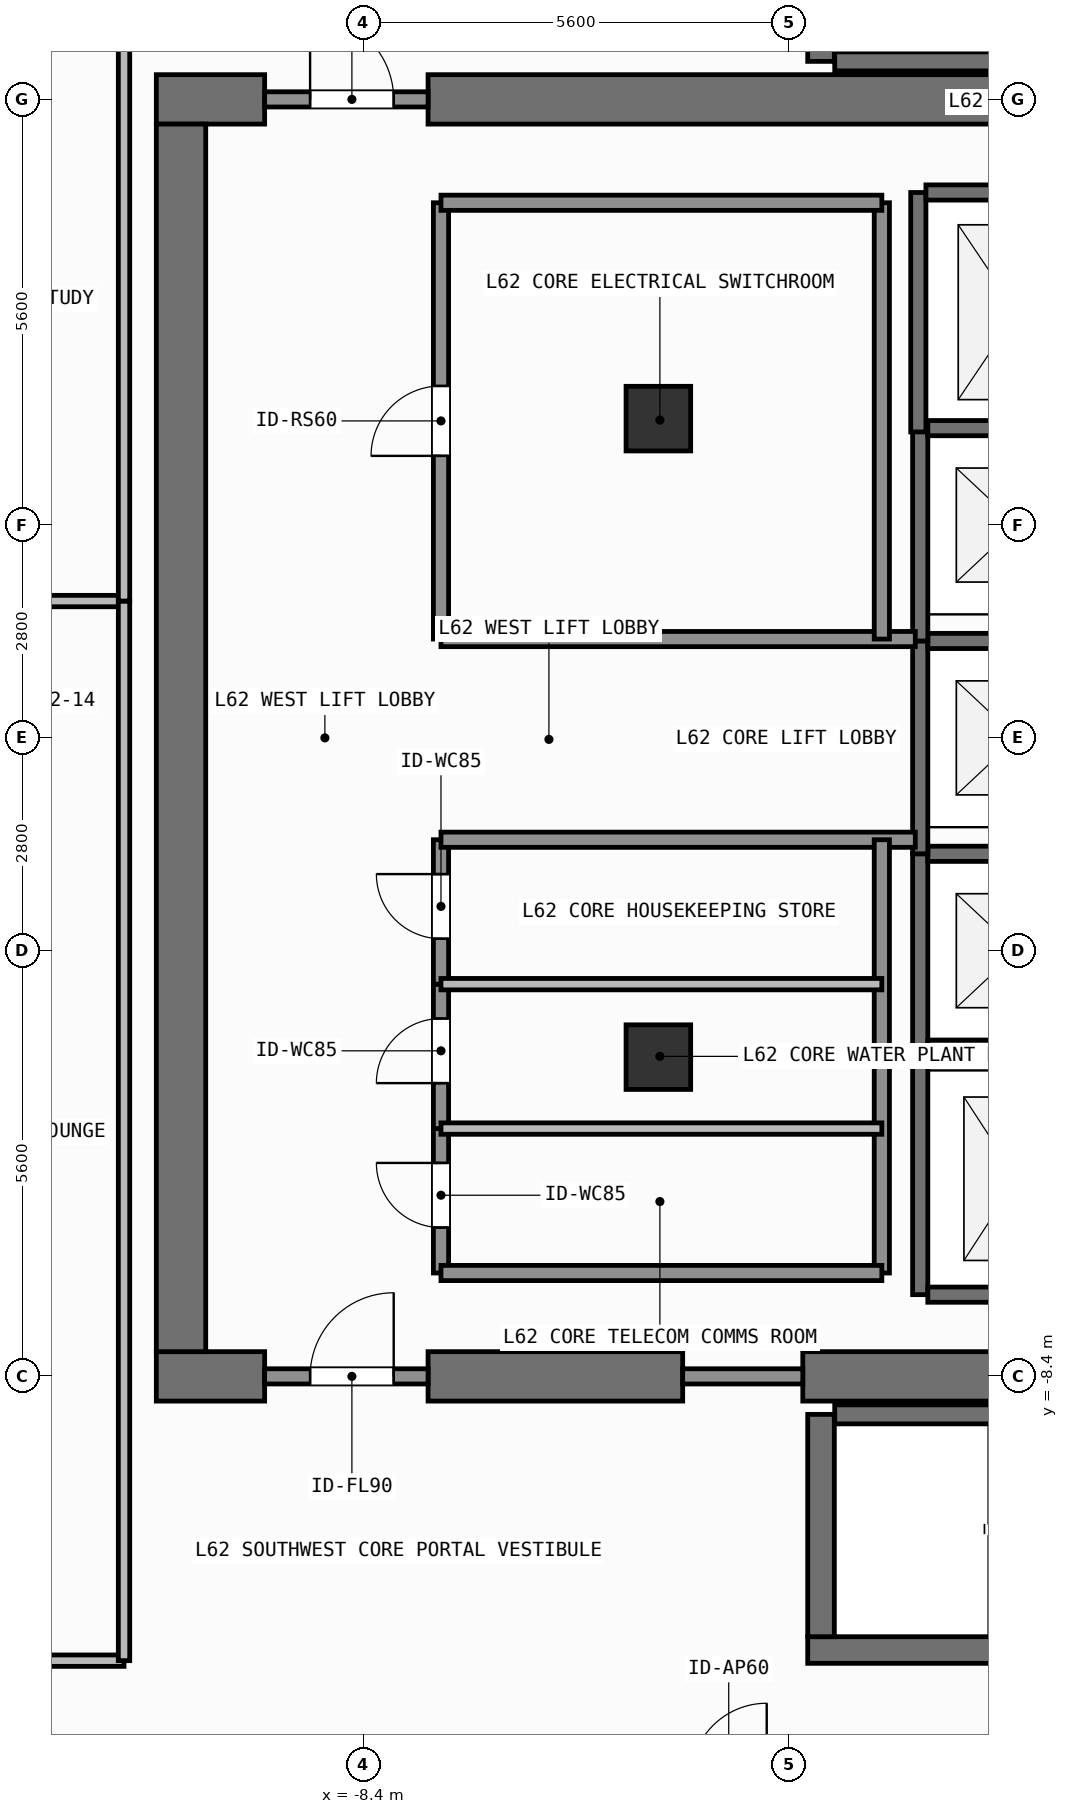
"""IFC4 building model, lengths in metres.
Left out: names, types, materials, properties, quantities, classifications, styles, units other than length and angle.
Written with IfcOpenShell. Run it as: python <this file> out.ifc"""

import sys

from ifc_helpers import new_model, si_unit, direction, frame, frame_2d, origin, origin_2d, place, context, subcontext, project, spatial, rectangle, extrude, element, fill, save


model = new_model("IFC4")
c1 = context("Model", 3, precision=1e-05, world=origin(), true_north=direction((0.0, 1.0)))
c2 = subcontext(c1, "Body", "Model", "MODEL_VIEW")
j1 = project(units=[si_unit("LENGTHUNIT", "METRE"), si_unit("PLANEANGLEUNIT", "RADIAN")], contexts=[c1])
p1 = place(None, origin())
s1 = spatial("IfcSite", under=j1, at=p1, CompositionType="ELEMENT")
p2 = place(p1, origin())
s2 = spatial("IfcBuilding", under=s1, at=p2, CompositionType="ELEMENT")
p3 = place(p2, frame((0.0, 0.0, 254.7)))
s3 = spatial("IfcBuildingStorey", under=s2, at=p3, CompositionType="ELEMENT", Elevation=254.7)
p4 = place(p3, frame((-11.125, -8.4, 0.0), z_axis=(0.0, 0.0, 1.0), x_axis=(1.0, 0.0, 0.0)))
e1 = element("IfcWall", 1, at=p4, inside=s3, PredefinedType="SHEAR", context=c2, shape_type="SweptSolid", body=[
    extrude(rectangle(XDim=1.425, YDim=0.65, at=frame_2d((0.712, 0.0))), origin(), (0.0, 0.0, 1.0), 3.9),
])
p5 = place(p3, frame((-7.55, -8.4, 0.0), z_axis=(0.0, 0.0, 1.0), x_axis=(1.0, 0.0, 0.0)))
e2 = element("IfcWall", 2, at=p5, inside=s3, PredefinedType="SHEAR", context=c2, shape_type="SweptSolid", body=[
    extrude(rectangle(XDim=3.35, YDim=0.65, at=frame_2d((1.675, 0.0))), origin(), (0.0, 0.0, 1.0), 3.9),
])
p6 = place(p3, frame((-2.62, -8.4, 0.0), z_axis=(0.0, 0.0, 1.0), x_axis=(1.0, 0.0, 0.0)))
e3 = element("IfcWall", 3, at=p6, inside=s3, PredefinedType="SHEAR", context=c2, shape_type="SweptSolid", body=[
    extrude(rectangle(XDim=7.27, YDim=0.65, at=frame_2d((3.635, 0.0))), origin(), (0.0, 0.0, 1.0), 3.9),
])
p7 = place(p3, frame((-11.125, 8.4, 0.0), z_axis=(0.0, 0.0, 1.0), x_axis=(1.0, 0.0, 0.0)))
e4 = element("IfcWall", 4, at=p7, inside=s3, PredefinedType="SHEAR", context=c2, shape_type="SweptSolid", body=[
    extrude(rectangle(XDim=1.425, YDim=0.65, at=frame_2d((0.712, 0.0))), origin(), (0.0, 0.0, 1.0), 3.9),
])
p8 = place(p3, frame((-7.55, 8.4, 0.0), z_axis=(0.0, 0.0, 1.0), x_axis=(1.0, 0.0, 0.0)))
e5 = element("IfcWall", 5, at=p8, inside=s3, PredefinedType="SHEAR", context=c2, shape_type="SweptSolid", body=[
    extrude(rectangle(XDim=16.275, YDim=0.65, at=frame_2d((8.138, 0.0))), origin(), (0.0, 0.0, 1.0), 3.9),
])
p9 = place(p3, frame((-10.8, -8.075, 0.0), z_axis=(0.0, 0.0, 1.0), x_axis=(0.0, 1.0, 0.0)))
e6 = element("IfcWall", 6, at=p9, inside=s3, PredefinedType="SHEAR", context=c2, shape_type="SweptSolid", body=[
    extrude(rectangle(XDim=16.15, YDim=0.65, at=frame_2d((8.075, 0.0))), origin(), (0.0, 0.0, 1.0), 3.9),
])
p10 = place(p3, frame((-2.555, -12.0, 0.0), z_axis=(0.0, 0.0, 1.0), x_axis=(1.0, 0.0, 0.0)))
e7 = element("IfcWall", 7, at=p10, inside=s3, PredefinedType="SHEAR", context=c2, shape_type="SweptSolid", body=[
    extrude(rectangle(XDim=7.31, YDim=0.35, at=frame_2d((3.655, 0.0))), origin(), (0.0, 0.0, 1.0), 3.9),
])
p11 = place(p3, frame((-2.2, -8.9, 0.0), z_axis=(0.0, 0.0, 1.0), x_axis=(1.0, 0.0, 0.0)))
e8 = element("IfcWall", 8, at=p11, inside=s3, PredefinedType="SHEAR", context=c2, shape_type="SweptSolid", body=[
    extrude(rectangle(XDim=6.6, YDim=0.25, at=frame_2d((3.3, 0.0))), origin(), (0.0, 0.0, 1.0), 3.9),
])
p12 = place(p3, frame((-2.38, -11.825, 0.0), z_axis=(0.0, 0.0, 1.0), x_axis=(0.0, 1.0, 0.0)))
e9 = element("IfcWall", 9, at=p12, inside=s3, PredefinedType="SHEAR", context=c2, shape_type="SweptSolid", body=[
    extrude(rectangle(XDim=2.925, YDim=0.35, at=frame_2d((1.462, 0.0))), origin(), (0.0, 0.0, 1.0), 3.9),
])
p13 = place(p3, frame((-2.2, 8.9, 0.0), z_axis=(0.0, 0.0, 1.0), x_axis=(1.0, 0.0, 0.0)))
e10 = element("IfcWall", 10, at=p13, inside=s3, PredefinedType="SHEAR", context=c2, shape_type="SweptSolid", body=[
    extrude(rectangle(XDim=6.6, YDim=0.25, at=frame_2d((3.3, 0.0))), origin(), (0.0, 0.0, 1.0), 3.9),
])
p14 = place(p3, frame((-2.38, 8.9, 0.0), z_axis=(0.0, 0.0, 1.0), x_axis=(0.0, 1.0, 0.0)))
e11 = element("IfcWall", 11, at=p14, inside=s3, PredefinedType="SHEAR", context=c2, shape_type="SweptSolid", body=[
    extrude(rectangle(XDim=2.925, YDim=0.35, at=frame_2d((1.462, 0.0))), origin(), (0.0, 0.0, 1.0), 3.9),
])
for number, where, z_axis, x_axis in (
    (12, (-4.52, -4.2, 0.0), (0.0, 0.0, 1.0), (1.0, 0.0, 0.0)),
    (13, (-4.52, 4.2, 0.0), (0.0, 0.0, 1.0), (1.0, 0.0, 0.0)),
):
    element("IfcColumn", number, at=place(p3, frame(where, z_axis=z_axis, x_axis=x_axis)), inside=s3, PredefinedType="COLUMN", context=c2, shape_type="SweptSolid", body=[
        extrude(rectangle(XDim=0.85, YDim=0.85, at=origin_2d()), origin(), (0.0, 0.0, 1.0), 3.9),
    ])
p15 = place(p3, frame((-1.075, -4.275, 0.0), z_axis=(0.0, 0.0, 1.0), x_axis=(0.0, 1.0, 0.0)))
e14 = element("IfcWall", 14, at=p15, inside=s3, PredefinedType="SHEAR", context=c2, shape_type="SweptSolid", body=[
    extrude(rectangle(XDim=2.75, YDim=0.2, at=frame_2d((1.375, 0.0))), origin(), (0.0, 0.0, 1.0), 3.68),
])
for number, where, z_axis, x_axis in (
    (15, (-0.975, -4.075, 0.0), (0.0, 0.0, 1.0), (1.0, 0.0, 0.0)),
    (16, (-0.975, -1.525, 0.0), (0.0, 0.0, 1.0), (1.0, 0.0, 0.0)),
):
    element("IfcWall", number, at=place(p3, frame(where, z_axis=z_axis, x_axis=x_axis)), inside=s3, PredefinedType="SHEAR", context=c2, shape_type="SweptSolid", body=[
        extrude(rectangle(XDim=2.35, YDim=0.2, at=frame_2d((1.175, 0.0))), origin(), (0.0, 0.0, 1.0), 3.68),
    ])
p16 = place(p3, frame((-1.075, -1.525, 0.0), z_axis=(0.0, 0.0, 1.0), x_axis=(0.0, 1.0, 0.0)))
e17 = element("IfcWall", 17, at=p16, inside=s3, PredefinedType="SHEAR", context=c2, shape_type="SweptSolid", body=[
    extrude(rectangle(XDim=2.8, YDim=0.2, at=frame_2d((1.4, 0.0))), origin(), (0.0, 0.0, 1.0), 3.68),
])
p17 = place(p3, frame((-0.975, 1.275, 0.0), z_axis=(0.0, 0.0, 1.0), x_axis=(1.0, 0.0, 0.0)))
e18 = element("IfcWall", 18, at=p17, inside=s3, PredefinedType="SHEAR", context=c2, shape_type="SweptSolid", body=[
    extrude(rectangle(XDim=2.35, YDim=0.2, at=frame_2d((1.175, 0.0))), origin(), (0.0, 0.0, 1.0), 3.68),
])
p18 = place(p3, frame((-1.075, 1.275, 0.0), z_axis=(0.0, 0.0, 1.0), x_axis=(0.0, 1.0, 0.0)))
e19 = element("IfcWall", 19, at=p18, inside=s3, PredefinedType="SHEAR", context=c2, shape_type="SweptSolid", body=[
    extrude(rectangle(XDim=2.8, YDim=0.2, at=frame_2d((1.4, 0.0))), origin(), (0.0, 0.0, 1.0), 3.68),
])
p19 = place(p3, frame((-0.975, 4.075, 0.0), z_axis=(0.0, 0.0, 1.0), x_axis=(1.0, 0.0, 0.0)))
e20 = element("IfcWall", 20, at=p19, inside=s3, PredefinedType="SHEAR", context=c2, shape_type="SweptSolid", body=[
    extrude(rectangle(XDim=2.35, YDim=0.2, at=frame_2d((1.175, 0.0))), origin(), (0.0, 0.0, 1.0), 3.68),
])
p20 = place(p3, frame((-1.1, 4.025, 0.0), z_axis=(0.0, 0.0, 1.0), x_axis=(0.0, 1.0, 0.0)))
e21 = element("IfcWall", 21, at=p20, inside=s3, PredefinedType="SHEAR", context=c2, shape_type="SweptSolid", body=[
    extrude(rectangle(XDim=3.15, YDim=0.2, at=frame_2d((1.575, 0.0))), origin(), (0.0, 0.0, 1.0), 3.68),
])
p21 = place(p3, frame((-1.0, 7.175, 0.0), z_axis=(0.0, 0.0, 1.0), x_axis=(1.0, 0.0, 0.0)))
e22 = element("IfcWall", 22, at=p21, inside=s3, PredefinedType="SHEAR", context=c2, shape_type="SweptSolid", body=[
    extrude(rectangle(XDim=2.4, YDim=0.2, at=frame_2d((1.2, 0.0))), origin(), (0.0, 0.0, 1.0), 3.68),
])
p22 = place(p3, frame((-1.075, -7.325, 0.0), z_axis=(0.0, 0.0, 1.0), x_axis=(0.0, 1.0, 0.0)))
e23 = element("IfcWall", 23, at=p22, inside=s3, PredefinedType="SHEAR", context=c2, shape_type="SweptSolid", body=[
    extrude(rectangle(XDim=3.05, YDim=0.2, at=frame_2d((1.525, 0.0))), origin(), (0.0, 0.0, 1.0), 3.68),
])
p23 = place(p3, frame((-0.975, -7.325, 0.0), z_axis=(0.0, 0.0, 1.0), x_axis=(1.0, 0.0, 0.0)))
e24 = element("IfcWall", 24, at=p23, inside=s3, PredefinedType="SHEAR", context=c2, shape_type="SweptSolid", body=[
    extrude(rectangle(XDim=2.35, YDim=0.2, at=frame_2d((1.175, 0.0))), origin(), (0.0, 0.0, 1.0), 3.68),
])
p24 = place(p3, frame((-9.7, -8.4, 0.0), z_axis=(0.0, 0.0, 1.0), x_axis=(1.0, 0.0, 0.0)))
e25 = element("IfcWall", 25, at=p24, inside=s3, PredefinedType="SOLIDWALL", context=c2, shape_type="SweptSolid", body=[
    extrude(rectangle(XDim=2.15, YDim=0.2, at=frame_2d((1.075, 0.0))), origin(), (0.0, 0.0, 1.0), 2.92),
])
p25 = place(p24, frame((0.598, 0.0, 0.0)))
e26 = element("IfcOpeningElement", 26, at=p25, cuts=e25, PredefinedType="OPENING", context=c2, shape_type="SweptSolid", body=[
    extrude(rectangle(XDim=1.1, YDim=2.15, at=frame_2d((0.55, 1.075))), frame((0.0, 0.11, 0.0), z_axis=(0.0, -1.0, 0.0), x_axis=(1.0, 0.0, 0.0)), (0.0, 0.0, 1.0), 0.22),
])
p26 = place(p3, frame((-9.7, 8.4, 0.0), z_axis=(0.0, 0.0, 1.0), x_axis=(1.0, 0.0, 0.0)))
e27 = element("IfcWall", 27, at=p26, inside=s3, PredefinedType="SOLIDWALL", context=c2, shape_type="SweptSolid", body=[
    extrude(rectangle(XDim=2.15, YDim=0.2, at=frame_2d((1.075, 0.0))), origin(), (0.0, 0.0, 1.0), 2.92),
])
p27 = place(p26, frame((0.598, 0.0, 0.0)))
e28 = element("IfcOpeningElement", 28, at=p27, cuts=e27, PredefinedType="OPENING", context=c2, shape_type="SweptSolid", body=[
    extrude(rectangle(XDim=1.1, YDim=2.15, at=frame_2d((0.55, 1.075))), frame((0.0, 0.11, 0.0), z_axis=(0.0, -1.0, 0.0), x_axis=(1.0, 0.0, 0.0)), (0.0, 0.0, 1.0), 0.22),
])
p28 = place(p3, frame((-7.38, -7.04, 0.0), z_axis=(0.0, 0.0, 1.0), x_axis=(0.0, 1.0, 0.0)))
e29 = element("IfcWall", 29, at=p28, inside=s3, PredefinedType="SOLIDWALL", context=c2, shape_type="SweptSolid", body=[
    extrude(rectangle(XDim=1.9, YDim=0.2, at=frame_2d((0.95, 0.0))), origin(), (0.0, 0.0, 1.0), 3.68),
])
p29 = place(p28, frame((0.598, 0.0, 0.0)))
e30 = element("IfcOpeningElement", 30, at=p29, cuts=e29, PredefinedType="OPENING", context=c2, shape_type="SweptSolid", body=[
    extrude(rectangle(XDim=0.85, YDim=2.1, at=frame_2d((0.425, 1.05))), frame((0.0, 0.11, 0.0), z_axis=(0.0, -1.0, 0.0), x_axis=(1.0, 0.0, 0.0)), (0.0, 0.0, 1.0), 0.22),
])
p30 = place(p3, frame((-7.38, -5.14, 0.0), z_axis=(0.0, 0.0, 1.0), x_axis=(0.0, 1.0, 0.0)))
e31 = element("IfcWall", 31, at=p30, inside=s3, PredefinedType="SOLIDWALL", context=c2, shape_type="SweptSolid", body=[
    extrude(rectangle(XDim=1.9, YDim=0.2, at=frame_2d((0.95, 0.0))), origin(), (0.0, 0.0, 1.0), 3.68),
])
p31 = place(p30, frame((0.598, 0.0, 0.0)))
e32 = element("IfcOpeningElement", 32, at=p31, cuts=e31, PredefinedType="OPENING", context=c2, shape_type="SweptSolid", body=[
    extrude(rectangle(XDim=0.85, YDim=2.1, at=frame_2d((0.425, 1.05))), frame((0.0, 0.11, 0.0), z_axis=(0.0, -1.0, 0.0), x_axis=(1.0, 0.0, 0.0)), (0.0, 0.0, 1.0), 0.22),
])
p32 = place(p3, frame((-7.38, -3.24, 0.0), z_axis=(0.0, 0.0, 1.0), x_axis=(0.0, 1.0, 0.0)))
e33 = element("IfcWall", 33, at=p32, inside=s3, PredefinedType="SOLIDWALL", context=c2, shape_type="SweptSolid", body=[
    extrude(rectangle(XDim=1.9, YDim=0.2, at=frame_2d((0.95, 0.0))), origin(), (0.0, 0.0, 1.0), 3.68),
])
p33 = place(p32, frame((0.598, 0.0, 0.0)))
e34 = element("IfcOpeningElement", 34, at=p33, cuts=e33, PredefinedType="OPENING", context=c2, shape_type="SweptSolid", body=[
    extrude(rectangle(XDim=0.85, YDim=2.1, at=frame_2d((0.425, 1.05))), frame((0.0, 0.11, 0.0), z_axis=(0.0, -1.0, 0.0), x_axis=(1.0, 0.0, 0.0)), (0.0, 0.0, 1.0), 0.22),
])
p34 = place(p3, frame((-7.38, 1.3, 0.0), z_axis=(0.0, 0.0, 1.0), x_axis=(0.0, 1.0, 0.0)))
e35 = element("IfcWall", 35, at=p34, inside=s3, PredefinedType="SOLIDWALL", context=c2, shape_type="SweptSolid", body=[
    extrude(rectangle(XDim=5.74, YDim=0.2, at=frame_2d((2.87, 0.0))), origin(), (0.0, 0.0, 1.0), 3.68),
])
p35 = place(p34, frame((2.41, 0.0, 0.0)))
e36 = element("IfcOpeningElement", 36, at=p35, cuts=e35, PredefinedType="OPENING", context=c2, shape_type="SweptSolid", body=[
    extrude(rectangle(XDim=0.92, YDim=2.1, at=frame_2d((0.46, 1.05))), frame((0.0, 0.11, 0.0), z_axis=(0.0, -1.0, 0.0), x_axis=(1.0, 0.0, 0.0)), (0.0, 0.0, 1.0), 0.22),
])
p36 = place(p3, frame((-16.93, -12.14, 0.0), z_axis=(0.0, 0.0, 1.0), x_axis=(1.0, 0.0, 0.0)))
e37 = element("IfcWall", 37, at=p36, inside=s3, PredefinedType="PARTITIONING", context=c2, shape_type="SweptSolid", body=[
    extrude(rectangle(XDim=5.38, YDim=0.15, at=frame_2d((2.69, 0.0))), origin(), (0.0, 0.0, 1.0), 3.68),
])
p37 = place(p36, frame((2.24, 0.0, 0.0)))
e38 = element("IfcOpeningElement", 38, at=p37, cuts=e37, PredefinedType="OPENING", context=c2, shape_type="SweptSolid", body=[
    extrude(rectangle(XDim=0.9, YDim=2.1, at=frame_2d((0.45, 1.05))), frame((0.0, 0.085, 0.0), z_axis=(0.0, -1.0, 0.0), x_axis=(1.0, 0.0, 0.0)), (0.0, 0.0, 1.0), 0.17),
])
p38 = place(p3, frame((-4.2, -8.4, 0.0), z_axis=(0.0, 0.0, 1.0), x_axis=(1.0, 0.0, 0.0)))
e39 = element("IfcWall", 39, at=p38, inside=s3, PredefinedType="SOLIDWALL", context=c2, shape_type="SweptSolid", body=[
    extrude(rectangle(XDim=1.58, YDim=0.2, at=frame_2d((0.79, 0.0))), origin(), (0.0, 0.0, 1.0), 2.92),
])
for number, where, z_axis, x_axis in (
    (40, (-7.38, -1.34, 0.0), (0.0, 0.0, 1.0), (1.0, 0.0, 0.0)),
    (41, (-7.38, 1.3, 0.0), (0.0, 0.0, 1.0), (1.0, 0.0, 0.0)),
):
    element("IfcWall", number, at=place(p3, frame(where, z_axis=z_axis, x_axis=x_axis)), inside=s3, PredefinedType="SOLIDWALL", context=c2, shape_type="SweptSolid", body=[
        extrude(rectangle(XDim=6.24, YDim=0.2, at=frame_2d((3.12, 0.0))), origin(), (0.0, 0.0, 1.0), 3.68),
    ])
p39 = place(p3, frame((-1.58, -7.04, 0.0), z_axis=(0.0, 0.0, 1.0), x_axis=(0.0, 1.0, 0.0)))
e42 = element("IfcWall", 42, at=p39, inside=s3, PredefinedType="SOLIDWALL", context=c2, shape_type="SweptSolid", body=[
    extrude(rectangle(XDim=5.7, YDim=0.2, at=frame_2d((2.85, 0.0))), origin(), (0.0, 0.0, 1.0), 3.68),
])
p40 = place(p3, frame((-7.38, -7.04, 0.0), z_axis=(0.0, 0.0, 1.0), x_axis=(1.0, 0.0, 0.0)))
e43 = element("IfcWall", 43, at=p40, inside=s3, PredefinedType="SOLIDWALL", context=c2, shape_type="SweptSolid", body=[
    extrude(rectangle(XDim=5.8, YDim=0.2, at=frame_2d((2.9, 0.0))), origin(), (0.0, 0.0, 1.0), 3.68),
])
p41 = place(p3, frame((-1.58, 1.3, 0.0), z_axis=(0.0, 0.0, 1.0), x_axis=(0.0, 1.0, 0.0)))
e44 = element("IfcWall", 44, at=p41, inside=s3, PredefinedType="SOLIDWALL", context=c2, shape_type="SweptSolid", body=[
    extrude(rectangle(XDim=5.74, YDim=0.2, at=frame_2d((2.87, 0.0))), origin(), (0.0, 0.0, 1.0), 3.68),
])
p42 = place(p3, frame((-7.38, 7.04, 0.0), z_axis=(0.0, 0.0, 1.0), x_axis=(1.0, 0.0, 0.0)))
e45 = element("IfcWall", 45, at=p42, inside=s3, PredefinedType="SOLIDWALL", context=c2, shape_type="SweptSolid", body=[
    extrude(rectangle(XDim=5.8, YDim=0.2, at=frame_2d((2.9, 0.0))), origin(), (0.0, 0.0, 1.0), 3.68),
])
for number, where, z_axis, x_axis in (
    (46, (-7.38, -5.14, 0.0), (0.0, 0.0, 1.0), (1.0, 0.0, 0.0)),
    (47, (-7.38, -3.24, 0.0), (0.0, 0.0, 1.0), (1.0, 0.0, 0.0)),
):
    element("IfcWall", number, at=place(p3, frame(where, z_axis=z_axis, x_axis=x_axis)), inside=s3, PredefinedType="PARTITIONING", context=c2, shape_type="SweptSolid", body=[
        extrude(rectangle(XDim=5.8, YDim=0.15, at=frame_2d((2.9, 0.0))), origin(), (0.0, 0.0, 1.0), 3.68),
    ])
p43 = place(p3, frame((-16.93, 1.8, 0.0), z_axis=(0.0, 0.0, 1.0), x_axis=(1.0, 0.0, 0.0)))
e48 = element("IfcWall", 48, at=p43, inside=s3, PredefinedType="PARTITIONING", context=c2, shape_type="SweptSolid", body=[
    extrude(rectangle(XDim=5.38, YDim=0.15, at=frame_2d((2.69, 0.0))), origin(), (0.0, 0.0, 1.0), 3.68),
])
p44 = place(p3, frame((-11.55, -12.14, 0.0), z_axis=(0.0, 0.0, 1.0), x_axis=(0.0, 1.0, 0.0)))
e49 = element("IfcWall", 49, at=p44, inside=s3, PredefinedType="PARTITIONING", context=c2, shape_type="SweptSolid", body=[
    extrude(rectangle(XDim=13.94, YDim=0.15, at=frame_2d((6.97, 0.0))), origin(), (0.0, 0.0, 1.0), 3.68),
])
p45 = place(p3, frame((-11.55, 1.8, 0.0), z_axis=(0.0, 0.0, 1.0), x_axis=(0.0, 1.0, 0.0)))
e50 = element("IfcWall", 50, at=p45, inside=s3, PredefinedType="PARTITIONING", context=c2, shape_type="SweptSolid", body=[
    extrude(rectangle(XDim=10.34, YDim=0.15, at=frame_2d((5.17, 0.0))), origin(), (0.0, 0.0, 1.0), 3.68),
])
p46 = place(p25, origin())
e51 = element("IfcDoor", 51, at=p46, inside=s3, OperationType="SINGLE_SWING_RIGHT", PredefinedType="DOOR", context=c2, shape_type="SweptSolid", body=[
    extrude(rectangle(XDim=1.1, YDim=2.15, at=frame_2d((0.55, 1.075))), frame((0.0, 0.025, 0.0), z_axis=(0.0, -1.0, 0.0), x_axis=(1.0, 0.0, 0.0)), (0.0, 0.0, 1.0), 0.05),
])
fill(e26, e51)
p47 = place(p27, origin())
e52 = element("IfcDoor", 52, at=p47, inside=s3, OperationType="SINGLE_SWING_LEFT", PredefinedType="DOOR", context=c2, shape_type="SweptSolid", body=[
    extrude(rectangle(XDim=1.1, YDim=2.15, at=frame_2d((0.55, 1.075))), frame((0.0, 0.025, 0.0), z_axis=(0.0, -1.0, 0.0), x_axis=(1.0, 0.0, 0.0)), (0.0, 0.0, 1.0), 0.05),
])
fill(e28, e52)
p48 = place(p29, origin())
e53 = element("IfcDoor", 53, at=p48, inside=s3, OperationType="SINGLE_SWING_RIGHT", PredefinedType="DOOR", context=c2, shape_type="SweptSolid", body=[
    extrude(rectangle(XDim=0.85, YDim=2.1, at=frame_2d((0.425, 1.05))), frame((0.0, 0.025, 0.0), z_axis=(0.0, -1.0, 0.0), x_axis=(1.0, 0.0, 0.0)), (0.0, 0.0, 1.0), 0.05),
])
fill(e30, e53)
p49 = place(p31, origin())
e54 = element("IfcDoor", 54, at=p49, inside=s3, OperationType="SINGLE_SWING_LEFT", PredefinedType="DOOR", context=c2, shape_type="SweptSolid", body=[
    extrude(rectangle(XDim=0.85, YDim=2.1, at=frame_2d((0.425, 1.05))), frame((0.0, 0.025, 0.0), z_axis=(0.0, -1.0, 0.0), x_axis=(1.0, 0.0, 0.0)), (0.0, 0.0, 1.0), 0.05),
])
fill(e32, e54)
p50 = place(p33, origin())
e55 = element("IfcDoor", 55, at=p50, inside=s3, OperationType="SINGLE_SWING_RIGHT", PredefinedType="DOOR", context=c2, shape_type="SweptSolid", body=[
    extrude(rectangle(XDim=0.85, YDim=2.1, at=frame_2d((0.425, 1.05))), frame((0.0, 0.025, 0.0), z_axis=(0.0, -1.0, 0.0), x_axis=(1.0, 0.0, 0.0)), (0.0, 0.0, 1.0), 0.05),
])
fill(e34, e55)
p51 = place(p35, origin())
e56 = element("IfcDoor", 56, at=p51, inside=s3, OperationType="SINGLE_SWING_LEFT", PredefinedType="DOOR", context=c2, shape_type="SweptSolid", body=[
    extrude(rectangle(XDim=0.92, YDim=2.1, at=frame_2d((0.46, 1.05))), frame((0.0, 0.025, 0.0), z_axis=(0.0, -1.0, 0.0), x_axis=(1.0, 0.0, 0.0)), (0.0, 0.0, 1.0), 0.05),
])
fill(e36, e56)
save(model, sys.argv[1])
